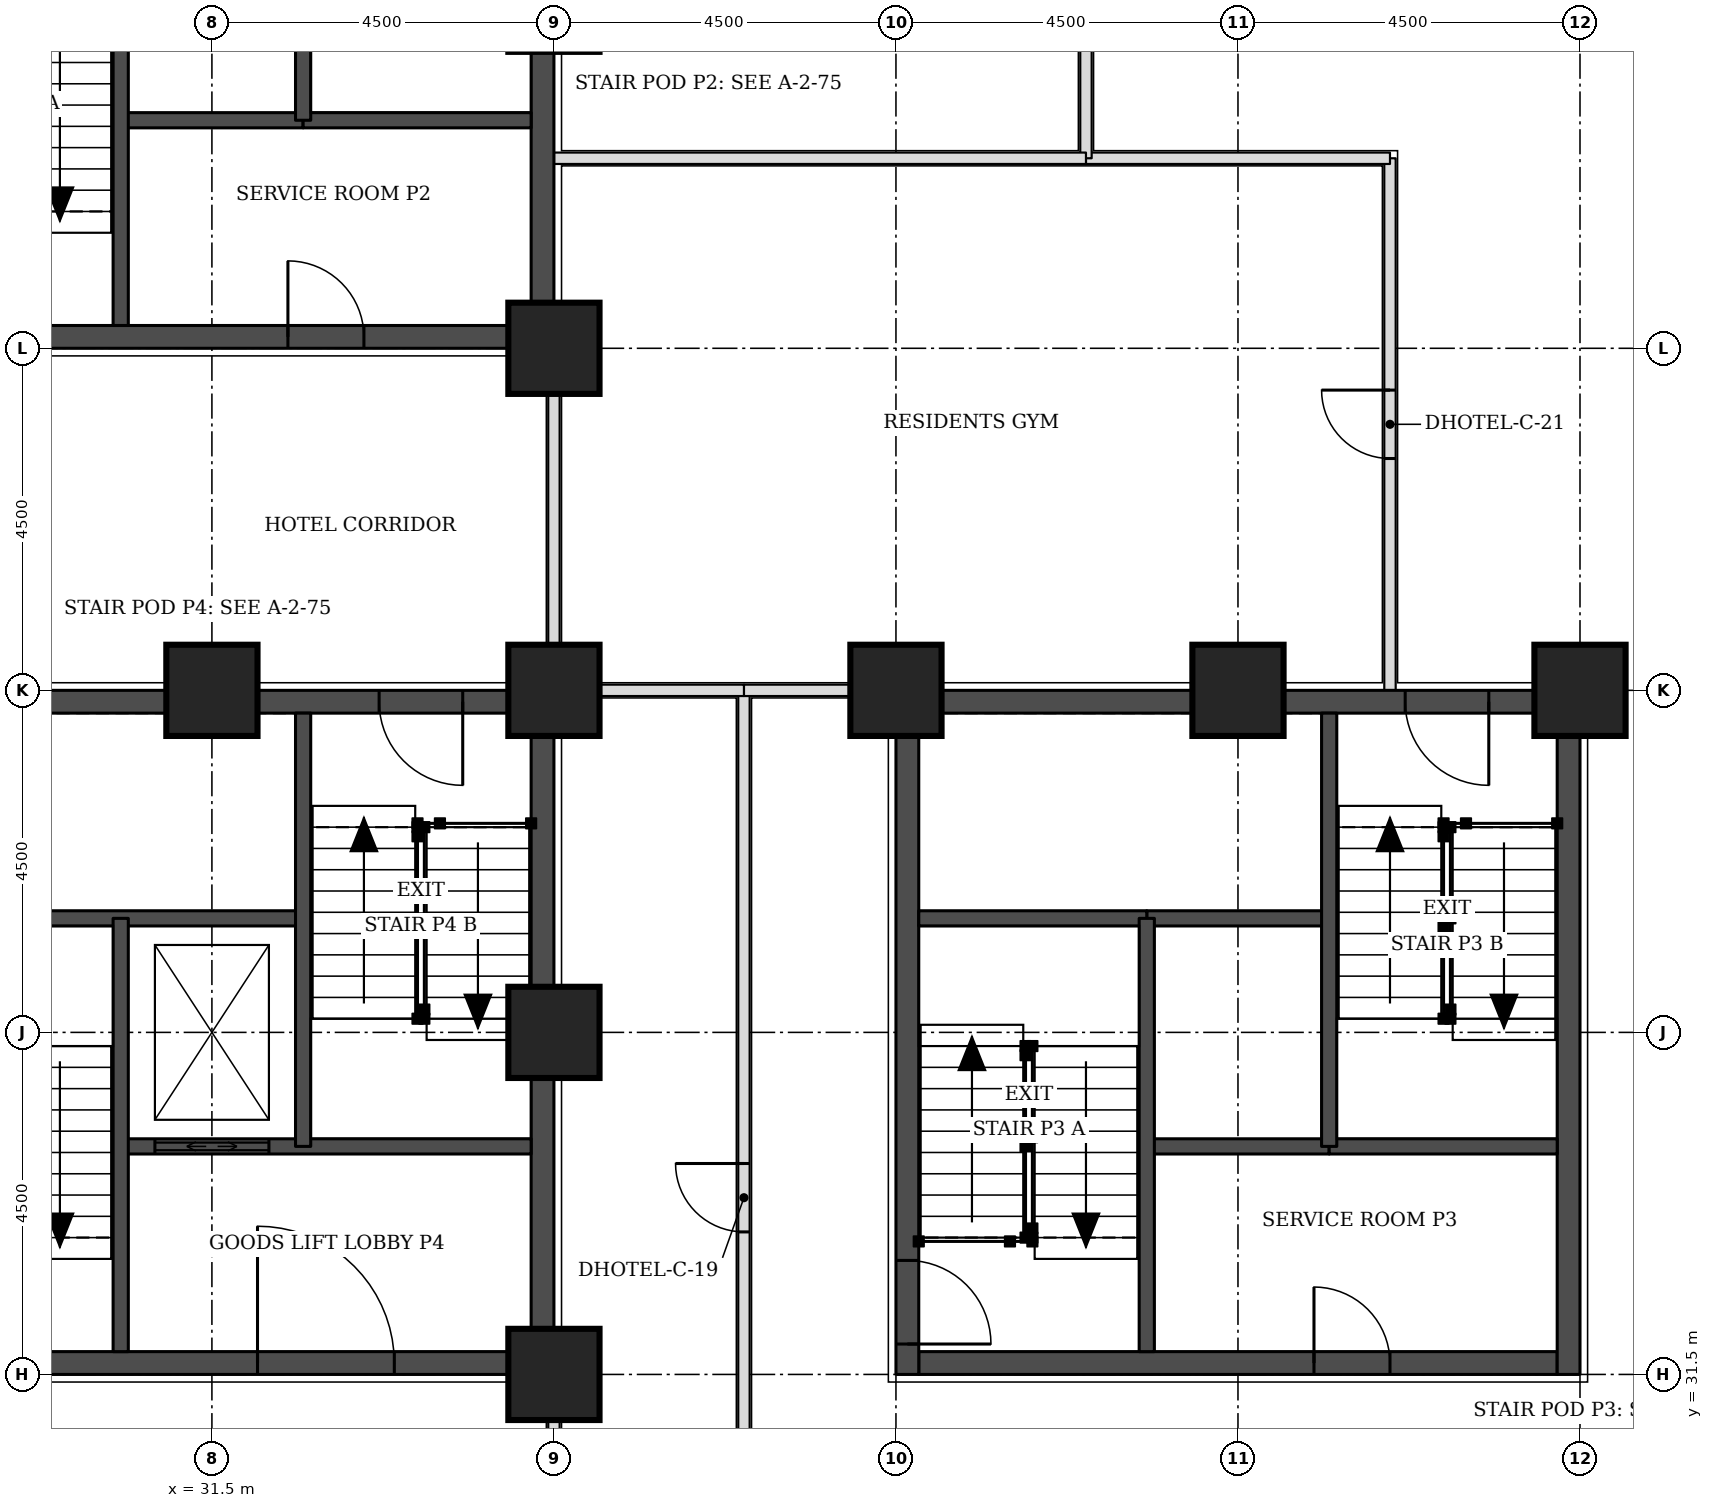
"""IFC4 building model, lengths in metres.
Left out: names, types, materials, properties, quantities, classifications, styles, units other than length and angle.
Written with IfcOpenShell. Run it as: python <this file> out.ifc"""

import sys

from ifc_helpers import new_model, si_unit, direction, frame, frame_2d, origin, origin_2d, place, context, subcontext, project, spatial, rectangle, extrude, element, fill, save


model = new_model("IFC4")
c1 = context("Model", 3, precision=1e-05, world=origin(), true_north=direction((0.0, 1.0)))
c2 = subcontext(c1, "Body", "Model", "MODEL_VIEW")
j1 = project(units=[si_unit("LENGTHUNIT", "METRE"), si_unit("PLANEANGLEUNIT", "RADIAN")], contexts=[c1])
p1 = place(None, origin())
s1 = spatial("IfcSite", under=j1, at=p1, CompositionType="ELEMENT")
p2 = place(p1, origin())
s2 = spatial("IfcBuilding", under=s1, at=p2, CompositionType="ELEMENT")
p3 = place(p2, frame((0.0, 0.0, 33.0)))
s3 = spatial("IfcBuildingStorey", under=s2, at=p3, CompositionType="ELEMENT", Elevation=33.0)
for number, where, z_axis, x_axis in (
    (1, (36.0, 31.5, 0.0), (0.0, 0.0, 1.0), (1.0, 0.0, 0.0)),
    (2, (36.0, 36.0, 0.0), (0.0, 0.0, 1.0), (1.0, 0.0, 0.0)),
    (3, (31.5, 40.5, 0.0), (0.0, 0.0, 1.0), (1.0, 0.0, 0.0)),
    (4, (36.0, 40.5, 0.0), (0.0, 0.0, 1.0), (1.0, 0.0, 0.0)),
    (5, (40.5, 40.5, 0.0), (0.0, 0.0, 1.0), (1.0, 0.0, 0.0)),
    (6, (45.0, 40.5, 0.0), (0.0, 0.0, 1.0), (1.0, 0.0, 0.0)),
    (7, (49.5, 40.5, 0.0), (0.0, 0.0, 1.0), (1.0, 0.0, 0.0)),
    (8, (36.0, 45.0, 0.0), (0.0, 0.0, 1.0), (1.0, 0.0, 0.0)),
):
    element("IfcColumn", number, at=place(p3, frame(where, z_axis=z_axis, x_axis=x_axis)), inside=s3, PredefinedType="COLUMN", context=c2, shape_type="SweptSolid", body=[
        extrude(rectangle(XDim=1.2, YDim=1.2, at=origin_2d()), origin(), (0.0, 0.0, 1.0), 3.3),
    ])
p4 = place(p3, frame((27.3, 45.15, 0.0), z_axis=(0.0, 0.0, 1.0), x_axis=(1.0, 0.0, 0.0)))
e9 = element("IfcWall", 9, at=p4, inside=s3, PredefinedType="SHEAR", context=c2, shape_type="SweptSolid", body=[
    extrude(rectangle(XDim=8.4, YDim=0.3, at=frame_2d((4.2, 0.0))), origin(), (0.0, 0.0, 1.0), 3.3),
])
p5 = place(p4, frame((5.2, 0.0, 0.0)))
e10 = element("IfcOpeningElement", 10, at=p5, cuts=e9, PredefinedType="OPENING", context=c2, shape_type="SweptSolid", body=[
    extrude(rectangle(XDim=1.0, YDim=2.1, at=frame_2d((0.5, 1.05))), frame((0.0, 0.16, 0.0), z_axis=(0.0, -1.0, 0.0), x_axis=(1.0, 0.0, 0.0)), (0.0, 0.0, 1.0), 0.32),
])
p6 = place(p3, frame((35.85, 45.0, 0.0), z_axis=(0.0, 0.0, 1.0), x_axis=(0.0, 1.0, 0.0)))
e11 = element("IfcWall", 11, at=p6, inside=s3, PredefinedType="SHEAR", context=c2, shape_type="SweptSolid", body=[
    extrude(rectangle(XDim=9.0, YDim=0.3, at=frame_2d((4.5, 0.0))), origin(), (0.0, 0.0, 1.0), 3.3),
])
p7 = place(p3, frame((40.8, 31.65, 0.0), z_axis=(0.0, 0.0, 1.0), x_axis=(1.0, 0.0, 0.0)))
e12 = element("IfcWall", 12, at=p7, inside=s3, PredefinedType="SHEAR", context=c2, shape_type="SweptSolid", body=[
    extrude(rectangle(XDim=8.4, YDim=0.3, at=frame_2d((4.2, 0.0))), origin(), (0.0, 0.0, 1.0), 3.3),
])
p8 = place(p7, frame((5.2, 0.0, 0.0)))
e13 = element("IfcOpeningElement", 13, at=p8, cuts=e12, PredefinedType="OPENING", context=c2, shape_type="SweptSolid", body=[
    extrude(rectangle(XDim=1.0, YDim=2.1, at=frame_2d((0.5, 1.05))), frame((0.0, 0.16, 0.0), z_axis=(0.0, -1.0, 0.0), x_axis=(1.0, 0.0, 0.0)), (0.0, 0.0, 1.0), 0.32),
])
p9 = place(p3, frame((40.8, 40.35, 0.0), z_axis=(0.0, 0.0, 1.0), x_axis=(1.0, 0.0, 0.0)))
e14 = element("IfcWall", 14, at=p9, inside=s3, PredefinedType="SHEAR", context=c2, shape_type="SweptSolid", body=[
    extrude(rectangle(XDim=8.4, YDim=0.3, at=frame_2d((4.2, 0.0))), origin(), (0.0, 0.0, 1.0), 3.3),
])
p10 = place(p9, frame((6.4, 0.0, 0.0)))
e15 = element("IfcOpeningElement", 15, at=p10, cuts=e14, PredefinedType="OPENING", context=c2, shape_type="SweptSolid", body=[
    extrude(rectangle(XDim=1.1, YDim=2.1, at=frame_2d((0.55, 1.05))), frame((0.0, 0.16, 0.0), z_axis=(0.0, -1.0, 0.0), x_axis=(1.0, 0.0, 0.0)), (0.0, 0.0, 1.0), 0.32),
])
p11 = place(p3, frame((40.65, 31.5, 0.0), z_axis=(0.0, 0.0, 1.0), x_axis=(0.0, 1.0, 0.0)))
e16 = element("IfcWall", 16, at=p11, inside=s3, PredefinedType="SHEAR", context=c2, shape_type="SweptSolid", body=[
    extrude(rectangle(XDim=9.0, YDim=0.3, at=frame_2d((4.5, 0.0))), origin(), (0.0, 0.0, 1.0), 3.3),
])
p12 = place(p11, frame((0.4, 0.0, 0.0)))
e17 = element("IfcOpeningElement", 17, at=p12, cuts=e16, PredefinedType="OPENING", context=c2, shape_type="SweptSolid", body=[
    extrude(rectangle(XDim=1.1, YDim=2.1, at=frame_2d((0.55, 1.05))), frame((0.0, 0.16, 0.0), z_axis=(0.0, -1.0, 0.0), x_axis=(1.0, 0.0, 0.0)), (0.0, 0.0, 1.0), 0.32),
])
p13 = place(p3, frame((49.35, 31.5, 0.0), z_axis=(0.0, 0.0, 1.0), x_axis=(0.0, 1.0, 0.0)))
e18 = element("IfcWall", 18, at=p13, inside=s3, PredefinedType="SHEAR", context=c2, shape_type="SweptSolid", body=[
    extrude(rectangle(XDim=9.0, YDim=0.3, at=frame_2d((4.5, 0.0))), origin(), (0.0, 0.0, 1.0), 3.3),
])
p14 = place(p3, frame((27.3, 31.65, 0.0), z_axis=(0.0, 0.0, 1.0), x_axis=(1.0, 0.0, 0.0)))
e19 = element("IfcWall", 19, at=p14, inside=s3, PredefinedType="SHEAR", context=c2, shape_type="SweptSolid", body=[
    extrude(rectangle(XDim=8.4, YDim=0.3, at=frame_2d((4.2, 0.0))), origin(), (0.0, 0.0, 1.0), 3.3),
])
p15 = place(p14, frame((4.8, 0.0, 0.0)))
e20 = element("IfcOpeningElement", 20, at=p15, cuts=e19, PredefinedType="OPENING", context=c2, shape_type="SweptSolid", body=[
    extrude(rectangle(XDim=1.8, YDim=2.1, at=frame_2d((0.9, 1.05))), frame((0.0, 0.16, 0.0), z_axis=(0.0, -1.0, 0.0), x_axis=(1.0, 0.0, 0.0)), (0.0, 0.0, 1.0), 0.32),
])
p16 = place(p3, frame((27.3, 40.35, 0.0), z_axis=(0.0, 0.0, 1.0), x_axis=(1.0, 0.0, 0.0)))
e21 = element("IfcWall", 21, at=p16, inside=s3, PredefinedType="SHEAR", context=c2, shape_type="SweptSolid", body=[
    extrude(rectangle(XDim=8.4, YDim=0.3, at=frame_2d((4.2, 0.0))), origin(), (0.0, 0.0, 1.0), 3.3),
])
p17 = place(p16, frame((6.4, 0.0, 0.0)))
e22 = element("IfcOpeningElement", 22, at=p17, cuts=e21, PredefinedType="OPENING", context=c2, shape_type="SweptSolid", body=[
    extrude(rectangle(XDim=1.1, YDim=2.1, at=frame_2d((0.55, 1.05))), frame((0.0, 0.16, 0.0), z_axis=(0.0, -1.0, 0.0), x_axis=(1.0, 0.0, 0.0)), (0.0, 0.0, 1.0), 0.32),
])
p18 = place(p3, frame((35.85, 31.5, 0.0), z_axis=(0.0, 0.0, 1.0), x_axis=(0.0, 1.0, 0.0)))
e23 = element("IfcWall", 23, at=p18, inside=s3, PredefinedType="SHEAR", context=c2, shape_type="SweptSolid", body=[
    extrude(rectangle(XDim=9.0, YDim=0.3, at=frame_2d((4.5, 0.0))), origin(), (0.0, 0.0, 1.0), 3.3),
])
p19 = place(p3, frame((38.5, 27.15, 0.0), z_axis=(0.0, 0.0, 1.0), x_axis=(0.0, 1.0, 0.0)))
e24 = element("IfcWall", 24, at=p19, inside=s3, PredefinedType="PARTITIONING", context=c2, shape_type="SweptSolid", body=[
    extrude(rectangle(XDim=13.35, YDim=0.15, at=frame_2d((6.675, 0.0))), origin(), (0.0, 0.0, 1.0), 3.08),
])
p20 = place(p19, frame((6.225, 0.0, 0.0)))
e25 = element("IfcOpeningElement", 25, at=p20, cuts=e24, PredefinedType="OPENING", context=c2, shape_type="SweptSolid", body=[
    extrude(rectangle(XDim=0.9, YDim=2.1, at=frame_2d((0.45, 1.05))), frame((0.0, 0.085, 0.0), z_axis=(0.0, -1.0, 0.0), x_axis=(1.0, 0.0, 0.0)), (0.0, 0.0, 1.0), 0.17),
])
for number, where, z_axis, x_axis in (
    (26, (36.0, 29.5, 0.0), (0.0, 0.0, 1.0), (0.0, 1.0, 0.0)),
    (27, (38.5, 40.5, 0.0), (0.0, 0.0, 1.0), (1.0, 0.0, 0.0)),
):
    element("IfcWall", number, at=place(p3, frame(where, z_axis=z_axis, x_axis=x_axis)), inside=s3, PredefinedType="PARTITIONING", context=c2, shape_type="SweptSolid", body=[
        extrude(rectangle(XDim=1.95, YDim=0.15, at=frame_2d((0.975, 0.0))), origin(), (0.0, 0.0, 1.0), 2.33),
    ])
p21 = place(p3, frame((36.0, 40.55, 0.0), z_axis=(0.0, 0.0, 1.0), x_axis=(0.0, 1.0, 0.0)))
e28 = element("IfcWall", 28, at=p21, inside=s3, PredefinedType="PARTITIONING", context=c2, shape_type="SweptSolid", body=[
    extrude(rectangle(XDim=4.4, YDim=0.15, at=frame_2d((2.2, 0.0))), origin(), (0.0, 0.0, 1.0), 2.33),
])
p22 = place(p3, frame((47.0, 40.5, 0.0), z_axis=(0.0, 0.0, 1.0), x_axis=(0.0, 1.0, 0.0)))
e29 = element("IfcWall", 29, at=p22, inside=s3, PredefinedType="PARTITIONING", context=c2, shape_type="SweptSolid", body=[
    extrude(rectangle(XDim=7.0, YDim=0.15, at=frame_2d((3.5, 0.0))), origin(), (0.0, 0.0, 1.0), 3.08),
])
p23 = place(p22, frame((3.05, 0.0, 0.0)))
e30 = element("IfcOpeningElement", 30, at=p23, cuts=e29, PredefinedType="OPENING", context=c2, shape_type="SweptSolid", body=[
    extrude(rectangle(XDim=0.9, YDim=2.1, at=frame_2d((0.45, 1.05))), frame((0.0, 0.085, 0.0), z_axis=(0.0, -1.0, 0.0), x_axis=(1.0, 0.0, 0.0)), (0.0, 0.0, 1.0), 0.17),
])
p24 = place(p3, frame((43.0, 47.5, 0.0), z_axis=(0.0, 0.0, 1.0), x_axis=(1.0, 0.0, 0.0)))
e31 = element("IfcWall", 31, at=p24, inside=s3, PredefinedType="PARTITIONING", context=c2, shape_type="SweptSolid", body=[
    extrude(rectangle(XDim=4.0, YDim=0.15, at=frame_2d((2.0, 0.0))), origin(), (0.0, 0.0, 1.0), 3.08),
])
p25 = place(p3, frame((43.0, 47.5, 0.0), z_axis=(0.0, 0.0, 1.0), x_axis=(0.0, 1.0, 0.0)))
e32 = element("IfcWall", 32, at=p25, inside=s3, PredefinedType="PARTITIONING", context=c2, shape_type="SweptSolid", body=[
    extrude(rectangle(XDim=6.5, YDim=0.15, at=frame_2d((3.25, 0.0))), origin(), (0.0, 0.0, 1.0), 3.08),
])
p26 = place(p3, frame((36.05, 40.5, 0.0), z_axis=(0.0, 0.0, 1.0), x_axis=(1.0, 0.0, 0.0)))
e33 = element("IfcWall", 33, at=p26, inside=s3, PredefinedType="PARTITIONING", context=c2, shape_type="SweptSolid", body=[
    extrude(rectangle(XDim=2.45, YDim=0.15, at=frame_2d((1.225, 0.0))), origin(), (0.0, 0.0, 1.0), 2.33),
])
p27 = place(p3, frame((36.0, 47.5, 0.0), z_axis=(0.0, 0.0, 1.0), x_axis=(1.0, 0.0, 0.0)))
e34 = element("IfcWall", 34, at=p27, inside=s3, PredefinedType="PARTITIONING", context=c2, shape_type="SweptSolid", body=[
    extrude(rectangle(XDim=7.0, YDim=0.15, at=frame_2d((3.5, 0.0))), origin(), (0.0, 0.0, 1.0), 3.08),
])
p28 = place(p3, frame((30.3, 48.0, 0.0), z_axis=(0.0, 0.0, 1.0), x_axis=(1.0, 0.0, 0.0)))
e35 = element("IfcWall", 35, at=p28, inside=s3, PredefinedType="SOLIDWALL", context=c2, shape_type="SweptSolid", body=[
    extrude(rectangle(XDim=2.4, YDim=0.2, at=frame_2d((1.2, 0.0))), origin(), (0.0, 0.0, 1.0), 3.08),
])
p29 = place(p3, frame((32.7, 48.0, 0.0), z_axis=(0.0, 0.0, 1.0), x_axis=(1.0, 0.0, 0.0)))
e36 = element("IfcWall", 36, at=p29, inside=s3, PredefinedType="SOLIDWALL", context=c2, shape_type="SweptSolid", body=[
    extrude(rectangle(XDim=3.0, YDim=0.2, at=frame_2d((1.5, 0.0))), origin(), (0.0, 0.0, 1.0), 3.08),
])
for number, where, z_axis, x_axis in (
    (37, (30.3, 45.3, 0.0), (0.0, 0.0, 1.0), (0.0, 1.0, 0.0)),
    (38, (32.7, 48.0, 0.0), (0.0, 0.0, 1.0), (0.0, 1.0, 0.0)),
):
    element("IfcWall", number, at=place(p3, frame(where, z_axis=z_axis, x_axis=x_axis)), inside=s3, PredefinedType="SOLIDWALL", context=c2, shape_type="SweptSolid", body=[
        extrude(rectangle(XDim=5.7, YDim=0.2, at=frame_2d((2.85, 0.0))), origin(), (0.0, 0.0, 1.0), 3.08),
    ])
p30 = place(p3, frame((43.8, 34.5, 0.0), z_axis=(0.0, 0.0, 1.0), x_axis=(1.0, 0.0, 0.0)))
e39 = element("IfcWall", 39, at=p30, inside=s3, PredefinedType="SOLIDWALL", context=c2, shape_type="SweptSolid", body=[
    extrude(rectangle(XDim=2.4, YDim=0.2, at=frame_2d((1.2, 0.0))), origin(), (0.0, 0.0, 1.0), 3.08),
])
p31 = place(p3, frame((46.2, 34.5, 0.0), z_axis=(0.0, 0.0, 1.0), x_axis=(1.0, 0.0, 0.0)))
e40 = element("IfcWall", 40, at=p31, inside=s3, PredefinedType="SOLIDWALL", context=c2, shape_type="SweptSolid", body=[
    extrude(rectangle(XDim=3.0, YDim=0.2, at=frame_2d((1.5, 0.0))), origin(), (0.0, 0.0, 1.0), 3.08),
])
p32 = place(p3, frame((43.8, 37.5, 0.0), z_axis=(0.0, 0.0, 1.0), x_axis=(1.0, 0.0, 0.0)))
e41 = element("IfcWall", 41, at=p32, inside=s3, PredefinedType="SOLIDWALL", context=c2, shape_type="SweptSolid", body=[
    extrude(rectangle(XDim=2.4, YDim=0.2, at=frame_2d((1.2, 0.0))), origin(), (0.0, 0.0, 1.0), 3.3),
])
p33 = place(p3, frame((40.8, 37.5, 0.0), z_axis=(0.0, 0.0, 1.0), x_axis=(1.0, 0.0, 0.0)))
e42 = element("IfcWall", 42, at=p33, inside=s3, PredefinedType="SOLIDWALL", context=c2, shape_type="SweptSolid", body=[
    extrude(rectangle(XDim=3.0, YDim=0.2, at=frame_2d((1.5, 0.0))), origin(), (0.0, 0.0, 1.0), 3.08),
])
for number, where, z_axis, x_axis in (
    (43, (43.8, 31.8, 0.0), (0.0, 0.0, 1.0), (0.0, 1.0, 0.0)),
    (44, (46.2, 34.5, 0.0), (0.0, 0.0, 1.0), (0.0, 1.0, 0.0)),
):
    element("IfcWall", number, at=place(p3, frame(where, z_axis=z_axis, x_axis=x_axis)), inside=s3, PredefinedType="SOLIDWALL", context=c2, shape_type="SweptSolid", body=[
        extrude(rectangle(XDim=5.7, YDim=0.2, at=frame_2d((2.85, 0.0))), origin(), (0.0, 0.0, 1.0), 3.08),
    ])
p34 = place(p3, frame((30.3, 34.5, 0.0), z_axis=(0.0, 0.0, 1.0), x_axis=(1.0, 0.0, 0.0)))
e45 = element("IfcWall", 45, at=p34, inside=s3, PredefinedType="SOLIDWALL", context=c2, shape_type="SweptSolid", body=[
    extrude(rectangle(XDim=5.4, YDim=0.2, at=frame_2d((2.7, 0.0))), origin(), (0.0, 0.0, 1.0), 3.08),
])
p35 = place(p34, frame((0.45, 0.0, 0.0)))
e46 = element("IfcOpeningElement", 46, at=p35, cuts=e45, PredefinedType="OPENING", context=c2, shape_type="SweptSolid", body=[
    extrude(rectangle(XDim=1.5, YDim=2.1, at=frame_2d((0.75, 1.05))), frame((0.0, 0.11, 0.0), z_axis=(0.0, -1.0, 0.0), x_axis=(1.0, 0.0, 0.0)), (0.0, 0.0, 1.0), 0.22),
])
p36 = place(p3, frame((27.3, 37.5, 0.0), z_axis=(0.0, 0.0, 1.0), x_axis=(1.0, 0.0, 0.0)))
e47 = element("IfcWall", 47, at=p36, inside=s3, PredefinedType="SOLIDWALL", context=c2, shape_type="SweptSolid", body=[
    extrude(rectangle(XDim=5.4, YDim=0.2, at=frame_2d((2.7, 0.0))), origin(), (0.0, 0.0, 1.0), 3.08),
])
for number, where, z_axis, x_axis in (
    (48, (30.3, 31.8, 0.0), (0.0, 0.0, 1.0), (0.0, 1.0, 0.0)),
    (49, (32.7, 34.5, 0.0), (0.0, 0.0, 1.0), (0.0, 1.0, 0.0)),
):
    element("IfcWall", number, at=place(p3, frame(where, z_axis=z_axis, x_axis=x_axis)), inside=s3, PredefinedType="SOLIDWALL", context=c2, shape_type="SweptSolid", body=[
        extrude(rectangle(XDim=5.7, YDim=0.2, at=frame_2d((2.85, 0.0))), origin(), (0.0, 0.0, 1.0), 3.08),
    ])
p37 = place(p20, origin())
e50 = element("IfcDoor", 50, at=p37, inside=s3, OperationType="SINGLE_SWING_RIGHT", PredefinedType="DOOR", context=c2, shape_type="SweptSolid", body=[
    extrude(rectangle(XDim=0.9, YDim=2.1, at=frame_2d((0.45, 1.05))), frame((0.0, 0.025, 0.0), z_axis=(0.0, -1.0, 0.0), x_axis=(1.0, 0.0, 0.0)), (0.0, 0.0, 1.0), 0.05),
])
fill(e25, e50)
p38 = place(p23, origin())
e51 = element("IfcDoor", 51, at=p38, inside=s3, OperationType="SINGLE_SWING_RIGHT", PredefinedType="DOOR", context=c2, shape_type="SweptSolid", body=[
    extrude(rectangle(XDim=0.9, YDim=2.1, at=frame_2d((0.45, 1.05))), frame((0.0, 0.025, 0.0), z_axis=(0.0, -1.0, 0.0), x_axis=(1.0, 0.0, 0.0)), (0.0, 0.0, 1.0), 0.05),
])
fill(e30, e51)
p39 = place(p5, origin())
e52 = element("IfcDoor", 52, at=p39, inside=s3, OperationType="SINGLE_SWING_LEFT", PredefinedType="DOOR", context=c2, shape_type="SweptSolid", body=[
    extrude(rectangle(XDim=1.0, YDim=2.1, at=frame_2d((0.5, 1.05))), frame((0.0, 0.025, 0.0), z_axis=(0.0, -1.0, 0.0), x_axis=(1.0, 0.0, 0.0)), (0.0, 0.0, 1.0), 0.05),
])
fill(e10, e52)
p40 = place(p12, frame((1.1, 0.0, 0.0), z_axis=(0.0, 0.0, 1.0), x_axis=(-1.0, 0.0, 0.0)))
e53 = element("IfcDoor", 53, at=p40, inside=s3, OperationType="SINGLE_SWING_RIGHT", PredefinedType="DOOR", context=c2, shape_type="SweptSolid", body=[
    extrude(rectangle(XDim=1.1, YDim=2.1, at=frame_2d((0.55, 1.05))), frame((0.0, 0.025, 0.0), z_axis=(0.0, -1.0, 0.0), x_axis=(1.0, 0.0, 0.0)), (0.0, 0.0, 1.0), 0.05),
])
fill(e17, e53)
p41 = place(p10, frame((1.1, 0.0, 0.0), z_axis=(0.0, 0.0, 1.0), x_axis=(-1.0, 0.0, 0.0)))
e54 = element("IfcDoor", 54, at=p41, inside=s3, OperationType="SINGLE_SWING_LEFT", PredefinedType="DOOR", context=c2, shape_type="SweptSolid", body=[
    extrude(rectangle(XDim=1.1, YDim=2.1, at=frame_2d((0.55, 1.05))), frame((0.0, 0.025, 0.0), z_axis=(0.0, -1.0, 0.0), x_axis=(1.0, 0.0, 0.0)), (0.0, 0.0, 1.0), 0.05),
])
fill(e15, e54)
p42 = place(p8, origin())
e55 = element("IfcDoor", 55, at=p42, inside=s3, OperationType="SINGLE_SWING_LEFT", PredefinedType="DOOR", context=c2, shape_type="SweptSolid", body=[
    extrude(rectangle(XDim=1.0, YDim=2.1, at=frame_2d((0.5, 1.05))), frame((0.0, 0.025, 0.0), z_axis=(0.0, -1.0, 0.0), x_axis=(1.0, 0.0, 0.0)), (0.0, 0.0, 1.0), 0.05),
])
fill(e13, e55)
p43 = place(p17, frame((1.1, 0.0, 0.0), z_axis=(0.0, 0.0, 1.0), x_axis=(-1.0, 0.0, 0.0)))
e56 = element("IfcDoor", 56, at=p43, inside=s3, OperationType="SINGLE_SWING_LEFT", PredefinedType="DOOR", context=c2, shape_type="SweptSolid", body=[
    extrude(rectangle(XDim=1.1, YDim=2.1, at=frame_2d((0.55, 1.05))), frame((0.0, 0.025, 0.0), z_axis=(0.0, -1.0, 0.0), x_axis=(1.0, 0.0, 0.0)), (0.0, 0.0, 1.0), 0.05),
])
fill(e22, e56)
p44 = place(p35, origin())
e57 = element("IfcDoor", 57, at=p44, inside=s3, OperationType="DOUBLE_DOOR_SLIDING", PredefinedType="DOOR", context=c2, shape_type="SweptSolid", body=[
    extrude(rectangle(XDim=1.5, YDim=2.1, at=frame_2d((0.75, 1.05))), frame((0.0, 0.025, 0.0), z_axis=(0.0, -1.0, 0.0), x_axis=(1.0, 0.0, 0.0)), (0.0, 0.0, 1.0), 0.05),
])
fill(e46, e57)
p45 = place(p15, origin())
e58 = element("IfcDoor", 58, at=p45, inside=s3, OperationType="SINGLE_SWING_LEFT", PredefinedType="DOOR", context=c2, shape_type="SweptSolid", body=[
    extrude(rectangle(XDim=1.8, YDim=2.1, at=frame_2d((0.9, 1.05))), frame((0.0, 0.025, 0.0), z_axis=(0.0, -1.0, 0.0), x_axis=(1.0, 0.0, 0.0)), (0.0, 0.0, 1.0), 0.05),
])
fill(e20, e58)
save(model, sys.argv[1])
